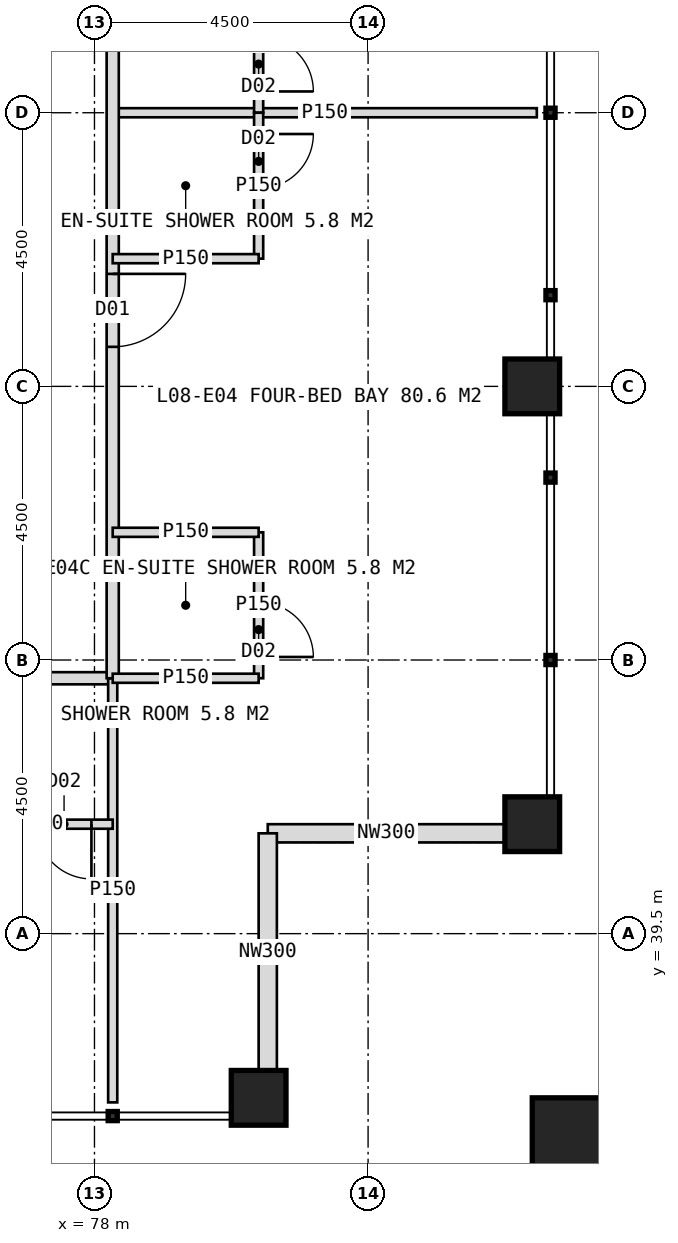
"""IFC4 building model, lengths in metres.
Left out: names, types, materials, properties, quantities, classifications, styles, units other than length and angle.
Written with IfcOpenShell. Run it as: python <this file> out.ifc"""

import sys

from ifc_helpers import new_model, si_unit, direction, frame, frame_2d, origin, origin_2d, place, context, subcontext, project, spatial, rectangle, hollow_rectangle, extrude, element, fill, save


model = new_model("IFC4")
c1 = context("Model", 3, precision=1e-05, world=origin(), true_north=direction((0.0, 1.0)))
c2 = subcontext(c1, "Body", "Model", "MODEL_VIEW")
j1 = project(units=[si_unit("LENGTHUNIT", "METRE"), si_unit("PLANEANGLEUNIT", "RADIAN")], contexts=[c1])
p1 = place(None, origin())
s1 = spatial("IfcSite", under=j1, at=p1, CompositionType="ELEMENT")
p2 = place(p1, origin())
s2 = spatial("IfcBuilding", under=s1, at=p2, CompositionType="ELEMENT")
p3 = place(p2, frame((0.0, 0.0, 39.0)))
s3 = spatial("IfcBuildingStorey", under=s2, at=p3, CompositionType="ELEMENT", Elevation=39.0)
for number, where, z_axis, x_axis in (
    (1, (85.2, 41.3, 0.0), (0.0, 0.0, 1.0), (1.0, 0.0, 0.0)),
    (2, (85.2, 48.5, 0.0), (0.0, 0.0, 1.0), (1.0, 0.0, 0.0)),
    (3, (80.7, 36.8, 0.0), (0.0, 0.0, 1.0), (1.0, 0.0, 0.0)),
):
    element("IfcColumn", number, at=place(p3, frame(where, z_axis=z_axis, x_axis=x_axis)), inside=s3, PredefinedType="COLUMN", context=c2, shape_type="SweptSolid", body=[
        extrude(hollow_rectangle(XDim=0.9, YDim=0.9, WallThickness=0.08, at=origin_2d()), origin(), (0.0, 0.0, 1.0), 4.0),
    ])
p4 = place(p3, frame((86.1, 35.9, 0.0), z_axis=(0.0, 0.0, 1.0), x_axis=(1.0, 0.0, 0.0)))
e4 = element("IfcColumn", 4, at=p4, inside=s3, PredefinedType="COLUMN", context=c2, shape_type="SweptSolid", body=[
    extrude(hollow_rectangle(XDim=1.8, YDim=1.8, WallThickness=0.1, at=origin_2d()), origin(), (0.0, 0.0, 1.0), 4.0),
])
for number, where, z_axis, x_axis in (
    (5, (84.75, 41.15, 0.0), (0.0, 0.0, 1.0), (-1.0, 0.0, 0.0)),
    (6, (80.85, 41.15, 0.0), (0.0, 0.0, 1.0), (0.0, -1.0, 0.0)),
):
    element("IfcWall", number, at=place(p3, frame(where, z_axis=z_axis, x_axis=x_axis)), inside=s3, PredefinedType="ELEMENTEDWALL", context=c2, shape_type="SweptSolid", body=[
        extrude(rectangle(XDim=3.9, YDim=0.3, at=frame_2d((1.95, 0.0))), origin(), (0.0, 0.0, 1.0), 2.95),
    ])
p5 = place(p3, frame((78.3, 43.7, 0.0), z_axis=(0.0, 0.0, 1.0), x_axis=(-1.0, 0.0, 0.0)))
e7 = element("IfcWall", 7, at=p5, inside=s3, PredefinedType="PARTITIONING", context=c2, shape_type="SweptSolid", body=[
    extrude(rectangle(XDim=36.6, YDim=0.2, at=frame_2d((18.3, 0.0))), origin(), (0.0, 0.0, 1.0), 3.75),
])
p6 = place(p5, frame((2.65, 0.0, 0.0)))
e8 = element("IfcOpeningElement", 8, at=p6, cuts=e7, PredefinedType="OPENING", context=c2, shape_type="SweptSolid", body=[
    extrude(rectangle(XDim=1.2, YDim=2.2, at=frame_2d((0.6, 1.1))), frame((0.0, 0.11, 0.0), z_axis=(0.0, -1.0, 0.0), x_axis=(1.0, 0.0, 0.0)), (0.0, 0.0, 1.0), 0.22),
])
p7 = place(p5, frame((11.95, 0.0, 0.0)))
e9 = element("IfcOpeningElement", 9, at=p7, cuts=e7, PredefinedType="OPENING", context=c2, shape_type="SweptSolid", body=[
    extrude(rectangle(XDim=1.2, YDim=2.2, at=frame_2d((0.6, 1.1))), frame((0.0, 0.11, 0.0), z_axis=(0.0, -1.0, 0.0), x_axis=(1.0, 0.0, 0.0)), (0.0, 0.0, 1.0), 0.22),
])
p8 = place(p5, frame((20.95, 0.0, 0.0)))
e10 = element("IfcOpeningElement", 10, at=p8, cuts=e7, PredefinedType="OPENING", context=c2, shape_type="SweptSolid", body=[
    extrude(rectangle(XDim=1.2, YDim=2.2, at=frame_2d((0.6, 1.1))), frame((0.0, 0.11, 0.0), z_axis=(0.0, -1.0, 0.0), x_axis=(1.0, 0.0, 0.0)), (0.0, 0.0, 1.0), 0.22),
])
p9 = place(p5, frame((29.95, 0.0, 0.0)))
e11 = element("IfcOpeningElement", 11, at=p9, cuts=e7, PredefinedType="OPENING", context=c2, shape_type="SweptSolid", body=[
    extrude(rectangle(XDim=1.2, YDim=2.2, at=frame_2d((0.6, 1.1))), frame((0.0, 0.11, 0.0), z_axis=(0.0, -1.0, 0.0), x_axis=(1.0, 0.0, 0.0)), (0.0, 0.0, 1.0), 0.22),
])
p10 = place(p3, frame((78.3, 43.7, 0.0), z_axis=(0.0, 0.0, 1.0), x_axis=(0.0, -1.0, 0.0)))
e12 = element("IfcWall", 12, at=p10, inside=s3, PredefinedType="PARTITIONING", context=c2, shape_type="SweptSolid", body=[
    extrude(rectangle(XDim=6.975, YDim=0.15, at=frame_2d((3.487, 0.0))), origin(), (0.0, 0.0, 1.0), 3.75),
])
p11 = place(p3, frame((78.3, 41.3, 0.0), z_axis=(0.0, 0.0, 1.0), x_axis=(-1.0, 0.0, 0.0)))
e13 = element("IfcWall", 13, at=p11, inside=s3, PredefinedType="PARTITIONING", context=c2, shape_type="SweptSolid", body=[
    extrude(rectangle(XDim=2.4, YDim=0.15, at=frame_2d((1.2, 0.0))), origin(), (0.0, 0.0, 1.0), 2.95),
])
p12 = place(p11, frame((0.35, 0.0, 0.0)))
e14 = element("IfcOpeningElement", 14, at=p12, cuts=e13, PredefinedType="OPENING", context=c2, shape_type="SweptSolid", body=[
    extrude(rectangle(XDim=0.9, YDim=2.1, at=frame_2d((0.45, 1.05))), frame((0.0, 0.085, 0.0), z_axis=(0.0, -1.0, 0.0), x_axis=(1.0, 0.0, 0.0)), (0.0, 0.0, 1.0), 0.17),
])
p13 = place(p3, frame((78.3, 53.0, 0.0), z_axis=(0.0, 0.0, 1.0), x_axis=(1.0, 0.0, 0.0)))
e15 = element("IfcWall", 15, at=p13, inside=s3, PredefinedType="PARTITIONING", context=c2, shape_type="SweptSolid", body=[
    extrude(rectangle(XDim=6.975, YDim=0.15, at=frame_2d((3.487, 0.0))), origin(), (0.0, 0.0, 1.0), 3.75),
])
p14 = place(p3, frame((78.3, 80.3, 0.0), z_axis=(0.0, 0.0, 1.0), x_axis=(0.0, -1.0, 0.0)))
e16 = element("IfcWall", 16, at=p14, inside=s3, PredefinedType="PARTITIONING", context=c2, shape_type="SweptSolid", body=[
    extrude(rectangle(XDim=36.6, YDim=0.2, at=frame_2d((18.3, 0.0))), origin(), (0.0, 0.0, 1.0), 3.75),
])
p15 = place(p14, frame((2.65, 0.0, 0.0)))
e17 = element("IfcOpeningElement", 17, at=p15, cuts=e16, PredefinedType="OPENING", context=c2, shape_type="SweptSolid", body=[
    extrude(rectangle(XDim=1.2, YDim=2.2, at=frame_2d((0.6, 1.1))), frame((0.0, 0.11, 0.0), z_axis=(0.0, -1.0, 0.0), x_axis=(1.0, 0.0, 0.0)), (0.0, 0.0, 1.0), 0.22),
])
p16 = place(p14, frame((11.95, 0.0, 0.0)))
e18 = element("IfcOpeningElement", 18, at=p16, cuts=e16, PredefinedType="OPENING", context=c2, shape_type="SweptSolid", body=[
    extrude(rectangle(XDim=1.2, YDim=2.2, at=frame_2d((0.6, 1.1))), frame((0.0, 0.11, 0.0), z_axis=(0.0, -1.0, 0.0), x_axis=(1.0, 0.0, 0.0)), (0.0, 0.0, 1.0), 0.22),
])
p17 = place(p14, frame((20.95, 0.0, 0.0)))
e19 = element("IfcOpeningElement", 19, at=p17, cuts=e16, PredefinedType="OPENING", context=c2, shape_type="SweptSolid", body=[
    extrude(rectangle(XDim=1.2, YDim=2.2, at=frame_2d((0.6, 1.1))), frame((0.0, 0.11, 0.0), z_axis=(0.0, -1.0, 0.0), x_axis=(1.0, 0.0, 0.0)), (0.0, 0.0, 1.0), 0.22),
])
p18 = place(p14, frame((29.95, 0.0, 0.0)))
e20 = element("IfcOpeningElement", 20, at=p18, cuts=e16, PredefinedType="OPENING", context=c2, shape_type="SweptSolid", body=[
    extrude(rectangle(XDim=1.2, YDim=2.2, at=frame_2d((0.6, 1.1))), frame((0.0, 0.11, 0.0), z_axis=(0.0, -1.0, 0.0), x_axis=(1.0, 0.0, 0.0)), (0.0, 0.0, 1.0), 0.22),
])
p19 = place(p3, frame((80.7, 55.4, 0.0), z_axis=(0.0, 0.0, 1.0), x_axis=(0.0, -1.0, 0.0)))
e21 = element("IfcWall", 21, at=p19, inside=s3, PredefinedType="PARTITIONING", context=c2, shape_type="SweptSolid", body=[
    extrude(rectangle(XDim=2.4, YDim=0.15, at=frame_2d((1.2, 0.0))), origin(), (0.0, 0.0, 1.0), 3.75),
])
p20 = place(p19, frame((1.15, 0.0, 0.0)))
e22 = element("IfcOpeningElement", 22, at=p20, cuts=e21, PredefinedType="OPENING", context=c2, shape_type="SweptSolid", body=[
    extrude(rectangle(XDim=0.9, YDim=2.1, at=frame_2d((0.45, 1.05))), frame((0.0, 0.085, 0.0), z_axis=(0.0, -1.0, 0.0), x_axis=(1.0, 0.0, 0.0)), (0.0, 0.0, 1.0), 0.17),
])
p21 = place(p3, frame((80.7, 53.0, 0.0), z_axis=(0.0, 0.0, 1.0), x_axis=(0.0, -1.0, 0.0)))
e23 = element("IfcWall", 23, at=p21, inside=s3, PredefinedType="PARTITIONING", context=c2, shape_type="SweptSolid", body=[
    extrude(rectangle(XDim=2.4, YDim=0.15, at=frame_2d((1.2, 0.0))), origin(), (0.0, 0.0, 1.0), 3.75),
])
p22 = place(p21, frame((0.35, 0.0, 0.0)))
e24 = element("IfcOpeningElement", 24, at=p22, cuts=e23, PredefinedType="OPENING", context=c2, shape_type="SweptSolid", body=[
    extrude(rectangle(XDim=0.9, YDim=2.1, at=frame_2d((0.45, 1.05))), frame((0.0, 0.085, 0.0), z_axis=(0.0, -1.0, 0.0), x_axis=(1.0, 0.0, 0.0)), (0.0, 0.0, 1.0), 0.17),
])
p23 = place(p3, frame((78.3, 50.6, 0.0), z_axis=(0.0, 0.0, 1.0), x_axis=(1.0, 0.0, 0.0)))
e25 = element("IfcWall", 25, at=p23, inside=s3, PredefinedType="PARTITIONING", context=c2, shape_type="SweptSolid", body=[
    extrude(rectangle(XDim=2.4, YDim=0.15, at=frame_2d((1.2, 0.0))), origin(), (0.0, 0.0, 1.0), 3.75),
])
p24 = place(p3, frame((80.7, 46.1, 0.0), z_axis=(0.0, 0.0, 1.0), x_axis=(0.0, -1.0, 0.0)))
e26 = element("IfcWall", 26, at=p24, inside=s3, PredefinedType="PARTITIONING", context=c2, shape_type="SweptSolid", body=[
    extrude(rectangle(XDim=2.4, YDim=0.15, at=frame_2d((1.2, 0.0))), origin(), (0.0, 0.0, 1.0), 2.95),
])
p25 = place(p24, frame((1.15, 0.0, 0.0)))
e27 = element("IfcOpeningElement", 27, at=p25, cuts=e26, PredefinedType="OPENING", context=c2, shape_type="SweptSolid", body=[
    extrude(rectangle(XDim=0.9, YDim=2.1, at=frame_2d((0.45, 1.05))), frame((0.0, 0.085, 0.0), z_axis=(0.0, -1.0, 0.0), x_axis=(1.0, 0.0, 0.0)), (0.0, 0.0, 1.0), 0.17),
])
for number, where, z_axis, x_axis in (
    (28, (78.3, 46.1, 0.0), (0.0, 0.0, 1.0), (1.0, 0.0, 0.0)),
    (29, (78.3, 43.7, 0.0), (0.0, 0.0, 1.0), (1.0, 0.0, 0.0)),
):
    element("IfcWall", number, at=place(p3, frame(where, z_axis=z_axis, x_axis=x_axis)), inside=s3, PredefinedType="PARTITIONING", context=c2, shape_type="SweptSolid", body=[
        extrude(rectangle(XDim=2.4, YDim=0.15, at=frame_2d((1.2, 0.0))), origin(), (0.0, 0.0, 1.0), 3.75),
    ])
p26 = place(p12, origin())
e30 = element("IfcDoor", 30, at=p26, inside=s3, OperationType="SINGLE_SWING_LEFT", PredefinedType="DOOR", context=c2, shape_type="SweptSolid", body=[
    extrude(rectangle(XDim=0.9, YDim=2.1, at=frame_2d((0.45, 1.05))), frame((0.0, 0.025, 0.0), z_axis=(0.0, -1.0, 0.0), x_axis=(1.0, 0.0, 0.0)), (0.0, 0.0, 1.0), 0.05),
])
fill(e14, e30)
p27 = place(p20, origin())
e31 = element("IfcDoor", 31, at=p27, inside=s3, OperationType="SINGLE_SWING_RIGHT", PredefinedType="DOOR", context=c2, shape_type="SweptSolid", body=[
    extrude(rectangle(XDim=0.9, YDim=2.1, at=frame_2d((0.45, 1.05))), frame((0.0, 0.025, 0.0), z_axis=(0.0, -1.0, 0.0), x_axis=(1.0, 0.0, 0.0)), (0.0, 0.0, 1.0), 0.05),
])
fill(e22, e31)
p28 = place(p18, origin())
e32 = element("IfcDoor", 32, at=p28, inside=s3, OperationType="SINGLE_SWING_LEFT", PredefinedType="DOOR", context=c2, shape_type="SweptSolid", body=[
    extrude(rectangle(XDim=1.2, YDim=2.2, at=frame_2d((0.6, 1.1))), frame((0.0, 0.025, 0.0), z_axis=(0.0, -1.0, 0.0), x_axis=(1.0, 0.0, 0.0)), (0.0, 0.0, 1.0), 0.05),
])
fill(e20, e32)
p29 = place(p22, origin())
e33 = element("IfcDoor", 33, at=p29, inside=s3, OperationType="SINGLE_SWING_LEFT", PredefinedType="DOOR", context=c2, shape_type="SweptSolid", body=[
    extrude(rectangle(XDim=0.9, YDim=2.1, at=frame_2d((0.45, 1.05))), frame((0.0, 0.025, 0.0), z_axis=(0.0, -1.0, 0.0), x_axis=(1.0, 0.0, 0.0)), (0.0, 0.0, 1.0), 0.05),
])
fill(e24, e33)
p30 = place(p25, origin())
e34 = element("IfcDoor", 34, at=p30, inside=s3, OperationType="SINGLE_SWING_RIGHT", PredefinedType="DOOR", context=c2, shape_type="SweptSolid", body=[
    extrude(rectangle(XDim=0.9, YDim=2.1, at=frame_2d((0.45, 1.05))), frame((0.0, 0.025, 0.0), z_axis=(0.0, -1.0, 0.0), x_axis=(1.0, 0.0, 0.0)), (0.0, 0.0, 1.0), 0.05),
])
fill(e27, e34)
save(model, sys.argv[1])
